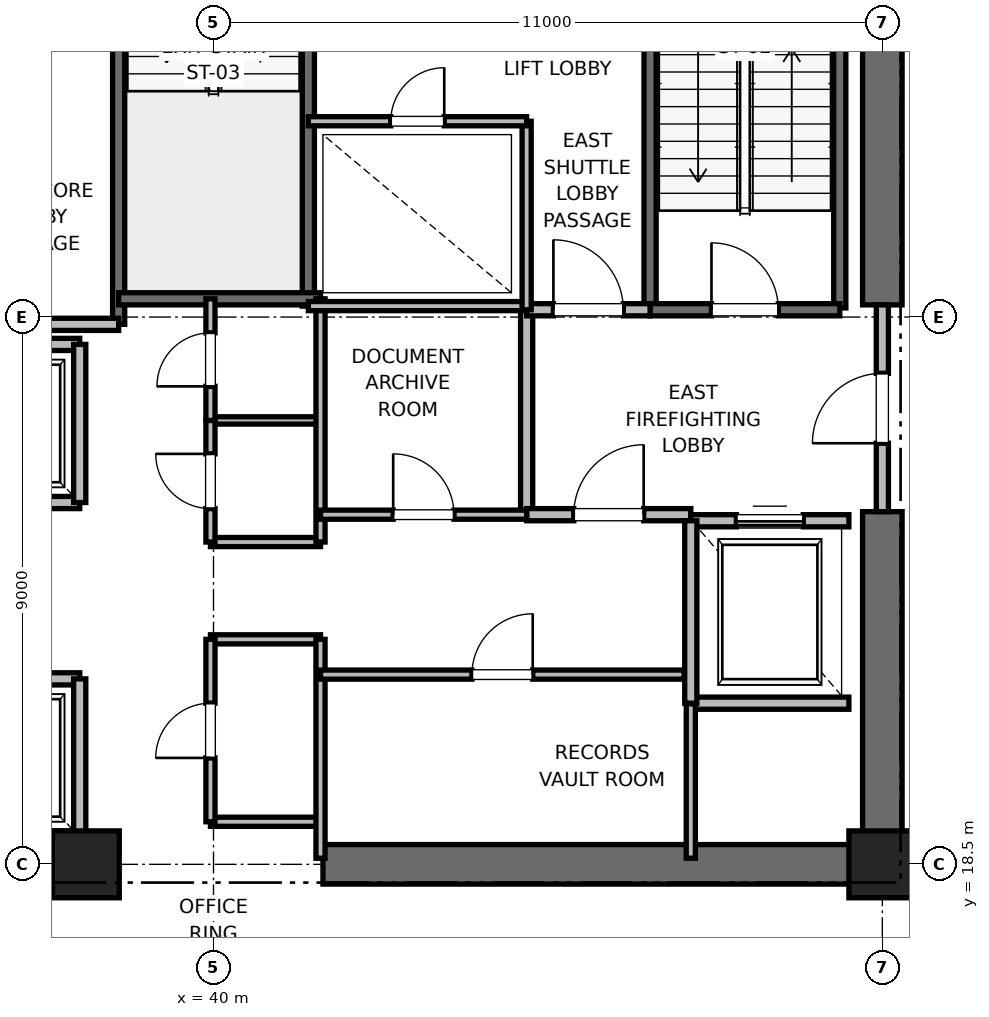
"""IFC4 building model, lengths in metres.
Left out: names, types, materials, properties, quantities, classifications, styles, units other than length and angle.
Written with IfcOpenShell. Run it as: python <this file> out.ifc"""

import sys

from ifc_helpers import new_model, si_unit, direction, frame, frame_2d, origin, origin_2d, place, context, subcontext, project, spatial, rectangle, extrude, element, fill, save


model = new_model("IFC4")
c1 = context("Model", 3, precision=1e-05, world=origin(), true_north=direction((0.0, 1.0)))
c2 = subcontext(c1, "Body", "Model", "MODEL_VIEW")
j1 = project(units=[si_unit("LENGTHUNIT", "METRE"), si_unit("PLANEANGLEUNIT", "RADIAN")], contexts=[c1])
p1 = place(None, origin())
s1 = spatial("IfcSite", under=j1, at=p1, CompositionType="ELEMENT")
p2 = place(p1, origin())
s2 = spatial("IfcBuilding", under=s1, at=p2, CompositionType="ELEMENT")
p3 = place(p2, frame((0.0, 0.0, 43.6)))
s3 = spatial("IfcBuildingStorey", under=s2, at=p3, CompositionType="ELEMENT", Elevation=43.6)
for number, where, z_axis, x_axis in (
    (1, (51.0, 18.5, 0.0), (0.0, 0.0, 1.0), (1.0, 0.0, 0.0)),
    (2, (37.9, 18.5, 0.0), (0.0, 0.0, 1.0), (1.0, 0.0, 0.0)),
):
    element("IfcColumn", number, at=place(p3, frame(where, z_axis=z_axis, x_axis=x_axis)), inside=s3, PredefinedType="PILASTER", context=c2, shape_type="SweptSolid", body=[
        extrude(rectangle(XDim=1.1, YDim=1.1, at=origin_2d()), origin(), (0.0, 0.0, 1.0), 4.0),
    ])
for number, where, z_axis, x_axis in (
    (3, (29.0, 18.5, 0.0), (0.0, 0.0, 1.0), (1.0, 0.0, 0.0)),
    (4, (41.8, 18.5, 0.0), (0.0, 0.0, 1.0), (1.0, 0.0, 0.0)),
):
    element("IfcWall", number, at=place(p3, frame(where, z_axis=z_axis, x_axis=x_axis)), inside=s3, PredefinedType="SHEAR", context=c2, shape_type="SweptSolid", body=[
        extrude(rectangle(XDim=9.2, YDim=0.65, at=frame_2d((4.6, 0.0))), origin(), (0.0, 0.0, 1.0), 3.76),
    ])
p4 = place(p3, frame((51.0, 18.5, 0.0), z_axis=(0.0, 0.0, 1.0), x_axis=(0.0, 1.0, 0.0)))
e5 = element("IfcWall", 5, at=p4, inside=s3, PredefinedType="SHEAR", context=c2, shape_type="SweptSolid", body=[
    extrude(rectangle(XDim=5.8, YDim=0.65, at=frame_2d((2.9, 0.0))), origin(), (0.0, 0.0, 1.0), 3.76),
])
p5 = place(p3, frame((51.0, 27.7, 0.0), z_axis=(0.0, 0.0, 1.0), x_axis=(0.0, 1.0, 0.0)))
e6 = element("IfcWall", 6, at=p5, inside=s3, PredefinedType="SHEAR", context=c2, shape_type="SweptSolid", body=[
    extrude(rectangle(XDim=8.8, YDim=0.65, at=frame_2d((4.4, 0.0))), origin(), (0.0, 0.0, 1.0), 3.76),
])
p6 = place(p3, frame((50.3, 27.65, 0.0), z_axis=(0.0, 0.0, 1.0), x_axis=(0.0, 1.0, 0.0)))
e7 = element("IfcWall", 7, at=p6, inside=s3, PredefinedType="SOLIDWALL", context=c2, shape_type="SweptSolid", body=[
    extrude(rectangle(XDim=8.15, YDim=0.2, at=frame_2d((4.075, 0.0))), origin(), (0.0, 0.0, 1.0), 3.76),
])
p7 = place(p3, frame((47.18, 27.62, 0.0), z_axis=(0.0, 0.0, 1.0), x_axis=(0.0, 1.0, 0.0)))
e8 = element("IfcWall", 8, at=p7, inside=s3, PredefinedType="SOLIDWALL", context=c2, shape_type="SweptSolid", body=[
    extrude(rectangle(XDim=8.18, YDim=0.2, at=frame_2d((4.09, 0.0))), origin(), (0.0, 0.0, 1.0), 3.76),
])
p8 = place(p3, frame((47.18, 27.62, 0.0), z_axis=(0.0, 0.0, 1.0), x_axis=(1.0, 0.0, 0.0)))
e9 = element("IfcWall", 9, at=p8, inside=s3, PredefinedType="SOLIDWALL", context=c2, shape_type="SweptSolid", body=[
    extrude(rectangle(XDim=3.12, YDim=0.2, at=frame_2d((1.56, 0.0))), origin(), (0.0, 0.0, 1.0), 3.76),
])
p9 = place(p8, frame((1.01, 0.0, 0.0)))
e10 = element("IfcOpeningElement", 10, at=p9, cuts=e9, PredefinedType="OPENING", context=c2, shape_type="SweptSolid", body=[
    extrude(rectangle(XDim=1.1, YDim=2.15, at=frame_2d((0.55, 1.075))), frame((0.0, 0.1, 0.0), z_axis=(0.0, -1.0, 0.0), x_axis=(1.0, 0.0, 0.0)), (0.0, 0.0, 1.0), 0.2),
])
p10 = place(p3, frame((38.44, 27.38, 0.0), z_axis=(0.0, 0.0, 1.0), x_axis=(0.0, 1.0, 0.0)))
e11 = element("IfcWall", 11, at=p10, inside=s3, PredefinedType="SOLIDWALL", context=c2, shape_type="SweptSolid", body=[
    extrude(rectangle(XDim=8.87, YDim=0.2, at=frame_2d((4.435, 0.0))), origin(), (0.0, 0.0, 1.0), 3.76),
])
p11 = place(p3, frame((41.56, 27.68, 0.0), z_axis=(0.0, 0.0, 1.0), x_axis=(0.0, 1.0, 0.0)))
e12 = element("IfcWall", 12, at=p11, inside=s3, PredefinedType="SOLIDWALL", context=c2, shape_type="SweptSolid", body=[
    extrude(rectangle(XDim=8.57, YDim=0.2, at=frame_2d((4.285, 0.0))), origin(), (0.0, 0.0, 1.0), 3.76),
])
p12 = place(p3, frame((38.44, 27.8, 0.0), z_axis=(0.0, 0.0, 1.0), x_axis=(1.0, 0.0, 0.0)))
e13 = element("IfcWall", 13, at=p12, inside=s3, PredefinedType="SOLIDWALL", context=c2, shape_type="SweptSolid", body=[
    extrude(rectangle(XDim=3.32, YDim=0.2, at=frame_2d((1.66, 0.0))), origin(), (0.0, 0.0, 1.0), 3.76),
])
p13 = place(p3, frame((32.82, 27.38, 0.0), z_axis=(0.0, 0.0, 1.0), x_axis=(1.0, 0.0, 0.0)))
e14 = element("IfcWall", 14, at=p13, inside=s3, PredefinedType="PARTITIONING", context=c2, shape_type="SweptSolid", body=[
    extrude(rectangle(XDim=5.62, YDim=0.2, at=frame_2d((2.81, 0.0))), origin(), (0.0, 0.0, 1.0), 3.76),
])
p14 = place(p3, frame((45.15, 24.25, 0.0), z_axis=(0.0, 0.0, 1.0), x_axis=(0.0, 1.0, 0.0)))
e15 = element("IfcWall", 15, at=p14, inside=s3, PredefinedType="PARTITIONING", context=c2, shape_type="SweptSolid", body=[
    extrude(rectangle(XDim=3.37, YDim=0.2, at=frame_2d((1.685, 0.0))), origin(), (0.0, 0.0, 1.0), 3.76),
])
p15 = place(p3, frame((45.15, 24.25, 0.0), z_axis=(0.0, 0.0, 1.0), x_axis=(1.0, 0.0, 0.0)))
e16 = element("IfcWall", 16, at=p15, inside=s3, PredefinedType="PARTITIONING", context=c2, shape_type="SweptSolid", body=[
    extrude(rectangle(XDim=2.7, YDim=0.2, at=frame_2d((1.35, 0.0))), origin(), (0.0, 0.0, 1.0), 3.76),
])
p16 = place(p15, frame((0.775, 0.0, 0.0)))
e17 = element("IfcOpeningElement", 17, at=p16, cuts=e16, PredefinedType="OPENING", context=c2, shape_type="SweptSolid", body=[
    extrude(rectangle(XDim=1.15, YDim=2.2, at=frame_2d((0.575, 1.1))), frame((0.0, 0.1, 0.0), z_axis=(0.0, -1.0, 0.0), x_axis=(1.0, 0.0, 0.0)), (0.0, 0.0, 1.0), 0.2),
])
p17 = place(p3, frame((45.15, 27.62, 0.0), z_axis=(0.0, 0.0, 1.0), x_axis=(1.0, 0.0, 0.0)))
e18 = element("IfcWall", 18, at=p17, inside=s3, PredefinedType="PARTITIONING", context=c2, shape_type="SweptSolid", body=[
    extrude(rectangle(XDim=2.03, YDim=0.2, at=frame_2d((1.015, 0.0))), origin(), (0.0, 0.0, 1.0), 3.76),
])
p18 = place(p17, frame((0.44, 0.0, 0.0)))
e19 = element("IfcOpeningElement", 19, at=p18, cuts=e18, PredefinedType="OPENING", context=c2, shape_type="SweptSolid", body=[
    extrude(rectangle(XDim=1.15, YDim=2.2, at=frame_2d((0.575, 1.1))), frame((0.0, 0.1, 0.0), z_axis=(0.0, -1.0, 0.0), x_axis=(1.0, 0.0, 0.0)), (0.0, 0.0, 1.0), 0.2),
])
p19 = place(p3, frame((51.0, 24.3, 0.0), z_axis=(0.0, 0.0, 1.0), x_axis=(0.0, 1.0, 0.0)))
e20 = element("IfcWall", 20, at=p19, inside=s3, PredefinedType="PARTITIONING", context=c2, shape_type="SweptSolid", body=[
    extrude(rectangle(XDim=3.4, YDim=0.2, at=frame_2d((1.7, 0.0))), origin(), (0.0, 0.0, 1.0), 2.54),
])
p20 = place(p19, frame((1.125, 0.0, 0.0)))
e21 = element("IfcOpeningElement", 21, at=p20, cuts=e20, PredefinedType="OPENING", context=c2, shape_type="SweptSolid", body=[
    extrude(rectangle(XDim=1.15, YDim=2.2, at=frame_2d((0.575, 1.1))), frame((0.0, 0.1, 0.0), z_axis=(0.0, -1.0, 0.0), x_axis=(1.0, 0.0, 0.0)), (0.0, 0.0, 1.0), 0.2),
])
p21 = place(p3, frame((47.85, 21.15, 0.0), z_axis=(0.0, 0.0, 1.0), x_axis=(1.0, 0.0, 0.0)))
e22 = element("IfcWall", 22, at=p21, inside=s3, PredefinedType="SOLIDWALL", context=c2, shape_type="SweptSolid", body=[
    extrude(rectangle(XDim=2.6, YDim=0.2, at=frame_2d((1.3, 0.0))), origin(), (0.0, 0.0, 1.0), 3.76),
])
p22 = place(p3, frame((50.45, 24.15, 0.0), z_axis=(0.0, 0.0, 1.0), x_axis=(-1.0, 0.0, 0.0)))
e23 = element("IfcWall", 23, at=p22, inside=s3, PredefinedType="SOLIDWALL", context=c2, shape_type="SweptSolid", body=[
    extrude(rectangle(XDim=2.6, YDim=0.2, at=frame_2d((1.3, 0.0))), origin(), (0.0, 0.0, 1.0), 2.54),
])
p23 = place(p22, frame((0.75, 0.0, 0.0)))
e24 = element("IfcOpeningElement", 24, at=p23, cuts=e23, PredefinedType="OPENING", context=c2, shape_type="SweptSolid", body=[
    extrude(rectangle(XDim=1.1, YDim=2.2, at=frame_2d((0.55, 1.1))), frame((0.0, 0.1, 0.0), z_axis=(0.0, -1.0, 0.0), x_axis=(1.0, 0.0, 0.0)), (0.0, 0.0, 1.0), 0.2),
])
p24 = place(p3, frame((47.85, 24.15, 0.0), z_axis=(0.0, 0.0, 1.0), x_axis=(0.0, -1.0, 0.0)))
e25 = element("IfcWall", 25, at=p24, inside=s3, PredefinedType="SOLIDWALL", context=c2, shape_type="SweptSolid", body=[
    extrude(rectangle(XDim=3.0, YDim=0.2, at=frame_2d((1.5, 0.0))), origin(), (0.0, 0.0, 1.0), 3.76),
])
p25 = place(p3, frame((35.5, 18.95, 0.0), z_axis=(0.0, 0.0, 1.0), x_axis=(1.0, 0.0, 0.0)))
e26 = element("IfcWall", 26, at=p25, inside=s3, PredefinedType="SOLIDWALL", context=c2, shape_type="SweptSolid", body=[
    extrude(rectangle(XDim=2.3, YDim=0.2, at=frame_2d((1.15, 0.0))), origin(), (0.0, 0.0, 1.0), 2.54),
])
p26 = place(p3, frame((37.8, 21.55, 0.0), z_axis=(0.0, 0.0, 1.0), x_axis=(-1.0, 0.0, 0.0)))
e27 = element("IfcWall", 27, at=p26, inside=s3, PredefinedType="SOLIDWALL", context=c2, shape_type="SweptSolid", body=[
    extrude(rectangle(XDim=2.3, YDim=0.2, at=frame_2d((1.15, 0.0))), origin(), (0.0, 0.0, 1.0), 3.76),
])
p27 = place(p26, frame((0.6, 0.0, 0.0)))
e28 = element("IfcOpeningElement", 28, at=p27, cuts=e27, PredefinedType="OPENING", context=c2, shape_type="SweptSolid", body=[
    extrude(rectangle(XDim=1.1, YDim=2.2, at=frame_2d((0.55, 1.1))), frame((0.0, 0.1, 0.0), z_axis=(0.0, -1.0, 0.0), x_axis=(1.0, 0.0, 0.0)), (0.0, 0.0, 1.0), 0.2),
])
p28 = place(p3, frame((37.8, 18.95, 0.0), z_axis=(0.0, 0.0, 1.0), x_axis=(0.0, 1.0, 0.0)))
e29 = element("IfcWall", 29, at=p28, inside=s3, PredefinedType="SOLIDWALL", context=c2, shape_type="SweptSolid", body=[
    extrude(rectangle(XDim=2.6, YDim=0.2, at=frame_2d((1.3, 0.0))), origin(), (0.0, 0.0, 1.0), 2.54),
])
p29 = place(p3, frame((35.5, 24.45, 0.0), z_axis=(0.0, 0.0, 1.0), x_axis=(1.0, 0.0, 0.0)))
e30 = element("IfcWall", 30, at=p29, inside=s3, PredefinedType="SOLIDWALL", context=c2, shape_type="SweptSolid", body=[
    extrude(rectangle(XDim=2.3, YDim=0.2, at=frame_2d((1.15, 0.0))), origin(), (0.0, 0.0, 1.0), 3.76),
])
p30 = place(p29, frame((0.6, 0.0, 0.0)))
e31 = element("IfcOpeningElement", 31, at=p30, cuts=e30, PredefinedType="OPENING", context=c2, shape_type="SweptSolid", body=[
    extrude(rectangle(XDim=1.1, YDim=2.2, at=frame_2d((0.55, 1.1))), frame((0.0, 0.1, 0.0), z_axis=(0.0, -1.0, 0.0), x_axis=(1.0, 0.0, 0.0)), (0.0, 0.0, 1.0), 0.2),
])
p31 = place(p3, frame((37.8, 27.05, 0.0), z_axis=(0.0, 0.0, 1.0), x_axis=(-1.0, 0.0, 0.0)))
e32 = element("IfcWall", 32, at=p31, inside=s3, PredefinedType="SOLIDWALL", context=c2, shape_type="SweptSolid", body=[
    extrude(rectangle(XDim=2.3, YDim=0.2, at=frame_2d((1.15, 0.0))), origin(), (0.0, 0.0, 1.0), 3.76),
])
p32 = place(p3, frame((37.8, 24.45, 0.0), z_axis=(0.0, 0.0, 1.0), x_axis=(0.0, 1.0, 0.0)))
e33 = element("IfcWall", 33, at=p32, inside=s3, PredefinedType="SOLIDWALL", context=c2, shape_type="SweptSolid", body=[
    extrude(rectangle(XDim=2.6, YDim=0.2, at=frame_2d((1.3, 0.0))), origin(), (0.0, 0.0, 1.0), 3.76),
])
for number, where, z_axis, x_axis in (
    (34, (39.95, 19.2, 0.0), (0.0, 0.0, 1.0), (1.0, 0.0, 0.0)),
    (35, (39.95, 22.2, 0.0), (0.0, 0.0, 1.0), (1.0, 0.0, 0.0)),
    (36, (39.95, 23.8, 0.0), (0.0, 0.0, 1.0), (1.0, 0.0, 0.0)),
):
    element("IfcWall", number, at=place(p3, frame(where, z_axis=z_axis, x_axis=x_axis)), inside=s3, PredefinedType="PARTITIONING", context=c2, shape_type="SweptSolid", body=[
        extrude(rectangle(XDim=1.81, YDim=0.15, at=frame_2d((0.905, 0.0))), origin(), (0.0, 0.0, 1.0), 2.85),
    ])
p33 = place(p3, frame((39.95, 25.8, 0.0), z_axis=(0.0, 0.0, 1.0), x_axis=(1.0, 0.0, 0.0)))
e37 = element("IfcWall", 37, at=p33, inside=s3, PredefinedType="PARTITIONING", context=c2, shape_type="SweptSolid", body=[
    extrude(rectangle(XDim=1.81, YDim=0.12, at=frame_2d((0.905, 0.0))), origin(), (0.0, 0.0, 1.0), 2.85),
])
p34 = place(p3, frame((41.76, 18.6, 0.0), z_axis=(0.0, 0.0, 1.0), x_axis=(0.0, 1.0, 0.0)))
e38 = element("IfcWall", 38, at=p34, inside=s3, PredefinedType="PARTITIONING", context=c2, shape_type="SweptSolid", body=[
    extrude(rectangle(XDim=3.6, YDim=0.15, at=frame_2d((1.8, 0.0))), origin(), (0.0, 0.0, 1.0), 2.54),
])
p35 = place(p3, frame((41.76, 23.8, 0.0), z_axis=(0.0, 0.0, 1.0), x_axis=(0.0, 1.0, 0.0)))
e39 = element("IfcWall", 39, at=p35, inside=s3, PredefinedType="PARTITIONING", context=c2, shape_type="SweptSolid", body=[
    extrude(rectangle(XDim=4.0, YDim=0.15, at=frame_2d((2.0, 0.0))), origin(), (0.0, 0.0, 1.0), 2.85),
])
p36 = place(p3, frame((39.95, 19.2, 0.0), z_axis=(0.0, 0.0, 1.0), x_axis=(0.0, 1.0, 0.0)))
e40 = element("IfcWall", 40, at=p36, inside=s3, PredefinedType="PARTITIONING", context=c2, shape_type="SweptSolid", body=[
    extrude(rectangle(XDim=3.0, YDim=0.15, at=frame_2d((1.5, 0.0))), origin(), (0.0, 0.0, 1.0), 2.85),
])
p37 = place(p36, frame((1.05, 0.0, 0.0)))
e41 = element("IfcOpeningElement", 41, at=p37, cuts=e40, PredefinedType="OPENING", context=c2, shape_type="SweptSolid", body=[
    extrude(rectangle(XDim=0.9, YDim=2.1, at=frame_2d((0.45, 1.05))), frame((0.0, 0.075, 0.0), z_axis=(0.0, -1.0, 0.0), x_axis=(1.0, 0.0, 0.0)), (0.0, 0.0, 1.0), 0.15),
])
p38 = place(p3, frame((39.95, 23.8, 0.0), z_axis=(0.0, 0.0, 1.0), x_axis=(0.0, 1.0, 0.0)))
e42 = element("IfcWall", 42, at=p38, inside=s3, PredefinedType="PARTITIONING", context=c2, shape_type="SweptSolid", body=[
    extrude(rectangle(XDim=2.0, YDim=0.15, at=frame_2d((1.0, 0.0))), origin(), (0.0, 0.0, 1.0), 2.85),
])
p39 = place(p38, frame((0.55, 0.0, 0.0)))
e43 = element("IfcOpeningElement", 43, at=p39, cuts=e42, PredefinedType="OPENING", context=c2, shape_type="SweptSolid", body=[
    extrude(rectangle(XDim=0.9, YDim=2.1, at=frame_2d((0.45, 1.05))), frame((0.0, 0.075, 0.0), z_axis=(0.0, -1.0, 0.0), x_axis=(1.0, 0.0, 0.0)), (0.0, 0.0, 1.0), 0.15),
])
p40 = place(p3, frame((39.95, 25.8, 0.0), z_axis=(0.0, 0.0, 1.0), x_axis=(0.0, 1.0, 0.0)))
e44 = element("IfcWall", 44, at=p40, inside=s3, PredefinedType="PARTITIONING", context=c2, shape_type="SweptSolid", body=[
    extrude(rectangle(XDim=2.0, YDim=0.15, at=frame_2d((1.0, 0.0))), origin(), (0.0, 0.0, 1.0), 2.85),
])
p41 = place(p40, frame((0.56, 0.0, 0.0)))
e45 = element("IfcOpeningElement", 45, at=p41, cuts=e44, PredefinedType="OPENING", context=c2, shape_type="SweptSolid", body=[
    extrude(rectangle(XDim=0.88, YDim=2.1, at=frame_2d((0.44, 1.05))), frame((0.0, 0.075, 0.0), z_axis=(0.0, -1.0, 0.0), x_axis=(1.0, 0.0, 0.0)), (0.0, 0.0, 1.0), 0.15),
])
p42 = place(p3, frame((41.56, 27.68, 0.0), z_axis=(0.0, 0.0, 1.0), x_axis=(1.0, 0.0, 0.0)))
e46 = element("IfcWall", 46, at=p42, inside=s3, PredefinedType="PARTITIONING", context=c2, shape_type="SweptSolid", body=[
    extrude(rectangle(XDim=3.59, YDim=0.15, at=frame_2d((1.795, 0.0))), origin(), (0.0, 0.0, 1.0), 2.85),
])
p43 = place(p3, frame((47.85, 18.6, 0.0), z_axis=(0.0, 0.0, 1.0), x_axis=(0.0, 1.0, 0.0)))
e47 = element("IfcWall", 47, at=p43, inside=s3, PredefinedType="PARTITIONING", context=c2, shape_type="SweptSolid", body=[
    extrude(rectangle(XDim=2.54, YDim=0.15, at=frame_2d((1.27, 0.0))), origin(), (0.0, 0.0, 1.0), 2.85),
])
p44 = place(p3, frame((41.76, 21.62, 0.0), z_axis=(0.0, 0.0, 1.0), x_axis=(1.0, 0.0, 0.0)))
e48 = element("IfcWall", 48, at=p44, inside=s3, PredefinedType="PARTITIONING", context=c2, shape_type="SweptSolid", body=[
    extrude(rectangle(XDim=5.98, YDim=0.15, at=frame_2d((2.99, 0.0))), origin(), (0.0, 0.0, 1.0), 2.85),
])
p45 = place(p44, frame((2.49, 0.0, 0.0)))
e49 = element("IfcOpeningElement", 49, at=p45, cuts=e48, PredefinedType="OPENING", context=c2, shape_type="SweptSolid", body=[
    extrude(rectangle(XDim=1.0, YDim=2.15, at=frame_2d((0.5, 1.075))), frame((0.0, 0.075, 0.0), z_axis=(0.0, -1.0, 0.0), x_axis=(1.0, 0.0, 0.0)), (0.0, 0.0, 1.0), 0.15),
])
p46 = place(p3, frame((41.76, 24.25, 0.0), z_axis=(0.0, 0.0, 1.0), x_axis=(1.0, 0.0, 0.0)))
e50 = element("IfcWall", 50, at=p46, inside=s3, PredefinedType="PARTITIONING", context=c2, shape_type="SweptSolid", body=[
    extrude(rectangle(XDim=3.39, YDim=0.15, at=frame_2d((1.695, 0.0))), origin(), (0.0, 0.0, 1.0), 2.85),
])
p47 = place(p46, frame((1.195, 0.0, 0.0)))
e51 = element("IfcOpeningElement", 51, at=p47, cuts=e50, PredefinedType="OPENING", context=c2, shape_type="SweptSolid", body=[
    extrude(rectangle(XDim=1.0, YDim=2.15, at=frame_2d((0.5, 1.075))), frame((0.0, 0.075, 0.0), z_axis=(0.0, -1.0, 0.0), x_axis=(1.0, 0.0, 0.0)), (0.0, 0.0, 1.0), 0.15),
])
p48 = place(p3, frame((45.15, 27.62, 0.0), z_axis=(0.0, 0.0, 1.0), x_axis=(0.0, 1.0, 0.0)))
e52 = element("IfcWall", 52, at=p48, inside=s3, PredefinedType="PARTITIONING", context=c2, shape_type="SweptSolid", body=[
    extrude(rectangle(XDim=3.1, YDim=0.15, at=frame_2d((1.55, 0.0))), origin(), (0.0, 0.0, 1.0), 2.85),
])
p49 = place(p3, frame((41.56, 30.72, 0.0), z_axis=(0.0, 0.0, 1.0), x_axis=(1.0, 0.0, 0.0)))
e53 = element("IfcWall", 53, at=p49, inside=s3, PredefinedType="PARTITIONING", context=c2, shape_type="SweptSolid", body=[
    extrude(rectangle(XDim=3.59, YDim=0.15, at=frame_2d((1.795, 0.0))), origin(), (0.0, 0.0, 1.0), 2.85),
])
p50 = place(p49, frame((1.355, 0.0, 0.0)))
e54 = element("IfcOpeningElement", 54, at=p50, cuts=e53, PredefinedType="OPENING", context=c2, shape_type="SweptSolid", body=[
    extrude(rectangle(XDim=0.88, YDim=2.1, at=frame_2d((0.44, 1.05))), frame((0.0, 0.075, 0.0), z_axis=(0.0, -1.0, 0.0), x_axis=(1.0, 0.0, 0.0)), (0.0, 0.0, 1.0), 0.15),
])
p51 = place(p9, origin())
e55 = element("IfcDoor", 55, at=p51, inside=s3, OperationType="SINGLE_SWING_LEFT", PredefinedType="DOOR", context=c2, shape_type="SweptSolid", body=[
    extrude(rectangle(XDim=1.1, YDim=2.15, at=frame_2d((0.55, 1.075))), frame((0.0, 0.025, 0.0), z_axis=(0.0, -1.0, 0.0), x_axis=(1.0, 0.0, 0.0)), (0.0, 0.0, 1.0), 0.05),
])
fill(e10, e55)
p52 = place(p16, origin())
e56 = element("IfcDoor", 56, at=p52, inside=s3, OperationType="SINGLE_SWING_RIGHT", PredefinedType="DOOR", context=c2, shape_type="SweptSolid", body=[
    extrude(rectangle(XDim=1.15, YDim=2.2, at=frame_2d((0.575, 1.1))), frame((0.0, 0.025, 0.0), z_axis=(0.0, -1.0, 0.0), x_axis=(1.0, 0.0, 0.0)), (0.0, 0.0, 1.0), 0.05),
])
fill(e17, e56)
p53 = place(p18, origin())
e57 = element("IfcDoor", 57, at=p53, inside=s3, OperationType="SINGLE_SWING_LEFT", PredefinedType="DOOR", context=c2, shape_type="SweptSolid", body=[
    extrude(rectangle(XDim=1.15, YDim=2.2, at=frame_2d((0.575, 1.1))), frame((0.0, 0.025, 0.0), z_axis=(0.0, -1.0, 0.0), x_axis=(1.0, 0.0, 0.0)), (0.0, 0.0, 1.0), 0.05),
])
fill(e19, e57)
p54 = place(p20, origin())
e58 = element("IfcDoor", 58, at=p54, inside=s3, OperationType="SINGLE_SWING_LEFT", PredefinedType="DOOR", context=c2, shape_type="SweptSolid", body=[
    extrude(rectangle(XDim=1.15, YDim=2.2, at=frame_2d((0.575, 1.1))), frame((0.0, 0.025, 0.0), z_axis=(0.0, -1.0, 0.0), x_axis=(1.0, 0.0, 0.0)), (0.0, 0.0, 1.0), 0.05),
])
fill(e21, e58)
p55 = place(p23, origin())
e59 = element("IfcDoor", 59, at=p55, inside=s3, OperationType="SLIDING_TO_RIGHT", PredefinedType="DOOR", context=c2, shape_type="SweptSolid", body=[
    extrude(rectangle(XDim=1.1, YDim=2.2, at=frame_2d((0.55, 1.1))), frame((0.0, 0.025, 0.0), z_axis=(0.0, -1.0, 0.0), x_axis=(1.0, 0.0, 0.0)), (0.0, 0.0, 1.0), 0.05),
])
fill(e24, e59)
p56 = place(p37, origin())
e60 = element("IfcDoor", 60, at=p56, inside=s3, OperationType="SINGLE_SWING_LEFT", PredefinedType="DOOR", context=c2, shape_type="SweptSolid", body=[
    extrude(rectangle(XDim=0.9, YDim=2.1, at=frame_2d((0.45, 1.05))), frame((0.0, 0.025, 0.0), z_axis=(0.0, -1.0, 0.0), x_axis=(1.0, 0.0, 0.0)), (0.0, 0.0, 1.0), 0.05),
])
fill(e41, e60)
p57 = place(p39, origin())
e61 = element("IfcDoor", 61, at=p57, inside=s3, OperationType="SINGLE_SWING_RIGHT", PredefinedType="DOOR", context=c2, shape_type="SweptSolid", body=[
    extrude(rectangle(XDim=0.9, YDim=2.1, at=frame_2d((0.45, 1.05))), frame((0.0, 0.025, 0.0), z_axis=(0.0, -1.0, 0.0), x_axis=(1.0, 0.0, 0.0)), (0.0, 0.0, 1.0), 0.05),
])
fill(e43, e61)
p58 = place(p41, origin())
e62 = element("IfcDoor", 62, at=p58, inside=s3, OperationType="SINGLE_SWING_LEFT", PredefinedType="DOOR", context=c2, shape_type="SweptSolid", body=[
    extrude(rectangle(XDim=0.88, YDim=2.1, at=frame_2d((0.44, 1.05))), frame((0.0, 0.025, 0.0), z_axis=(0.0, -1.0, 0.0), x_axis=(1.0, 0.0, 0.0)), (0.0, 0.0, 1.0), 0.05),
])
fill(e45, e62)
p59 = place(p45, origin())
e63 = element("IfcDoor", 63, at=p59, inside=s3, OperationType="SINGLE_SWING_RIGHT", PredefinedType="DOOR", context=c2, shape_type="SweptSolid", body=[
    extrude(rectangle(XDim=1.0, YDim=2.15, at=frame_2d((0.5, 1.075))), frame((0.0, 0.025, 0.0), z_axis=(0.0, -1.0, 0.0), x_axis=(1.0, 0.0, 0.0)), (0.0, 0.0, 1.0), 0.05),
])
fill(e49, e63)
p60 = place(p47, origin())
e64 = element("IfcDoor", 64, at=p60, inside=s3, OperationType="SINGLE_SWING_LEFT", PredefinedType="DOOR", context=c2, shape_type="SweptSolid", body=[
    extrude(rectangle(XDim=1.0, YDim=2.15, at=frame_2d((0.5, 1.075))), frame((0.0, 0.025, 0.0), z_axis=(0.0, -1.0, 0.0), x_axis=(1.0, 0.0, 0.0)), (0.0, 0.0, 1.0), 0.05),
])
fill(e51, e64)
p61 = place(p50, origin())
e65 = element("IfcDoor", 65, at=p61, inside=s3, OperationType="SINGLE_SWING_RIGHT", PredefinedType="DOOR", context=c2, shape_type="SweptSolid", body=[
    extrude(rectangle(XDim=0.88, YDim=2.1, at=frame_2d((0.44, 1.05))), frame((0.0, 0.025, 0.0), z_axis=(0.0, -1.0, 0.0), x_axis=(1.0, 0.0, 0.0)), (0.0, 0.0, 1.0), 0.05),
])
fill(e54, e65)
save(model, sys.argv[1])
